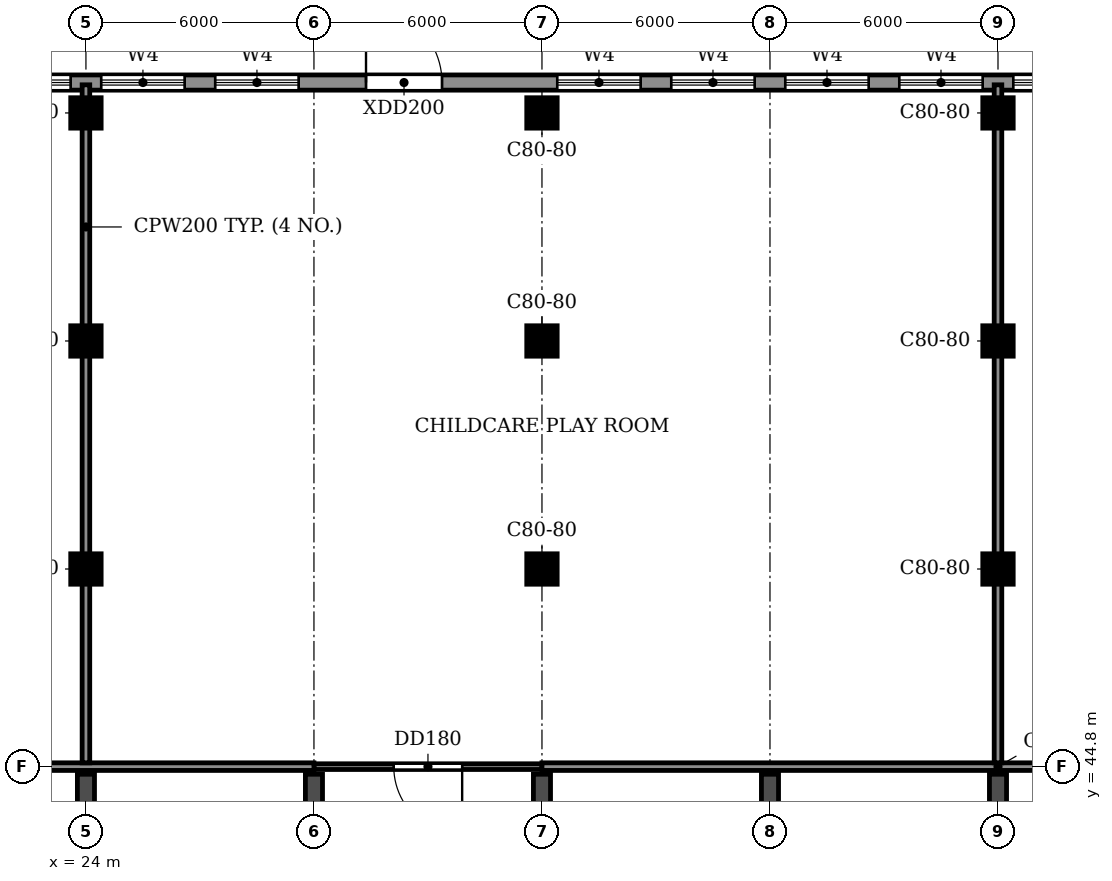
"""IFC4 building model, lengths in metres.
Left out: names, types, materials, properties, quantities, classifications, styles, units other than length and angle.
Written with IfcOpenShell. Run it as: python <this file> out.ifc"""

import sys

from ifc_helpers import new_model, si_unit, direction, frame, frame_2d, origin, origin_2d, place, context, subcontext, project, spatial, rectangle, extrude, source, transform, mapped, element, fill, save


model = new_model("IFC4")
c1 = context("Model", 3, precision=1e-05, world=origin(), true_north=direction((0.0, 1.0)))
c2 = subcontext(c1, "Body", "Model", "MODEL_VIEW")
j1 = project(units=[si_unit("LENGTHUNIT", "METRE"), si_unit("PLANEANGLEUNIT", "RADIAN")], contexts=[c1])
p1 = place(None, origin())
s1 = spatial("IfcSite", under=j1, at=p1, CompositionType="ELEMENT")
p2 = place(p1, origin())
s2 = spatial("IfcBuilding", under=s1, at=p2, CompositionType="ELEMENT")
p3 = place(p2, frame((0.0, 0.0, 10.8)))
s3 = spatial("IfcBuildingStorey", under=s2, at=p3, CompositionType="ELEMENT", Elevation=10.8)
for number, where, z_axis, x_axis in (
    (1, (24.0, 30.55, 0.0), (0.0, 0.0, 1.0), (0.0, 1.0, 0.0)),
    (2, (30.0, 30.55, 0.0), (0.0, 0.0, 1.0), (0.0, 1.0, 0.0)),
    (3, (36.0, 30.55, 0.0), (0.0, 0.0, 1.0), (0.0, 1.0, 0.0)),
    (4, (42.0, 30.55, 0.0), (0.0, 0.0, 1.0), (0.0, 1.0, 0.0)),
    (5, (48.0, 30.55, 0.0), (0.0, 0.0, 1.0), (0.0, 1.0, 0.0)),
):
    element("IfcWall", number, at=place(p3, frame(where, z_axis=z_axis, x_axis=x_axis)), inside=s3, PredefinedType="SHEAR", context=c2, shape_type="SweptSolid", body=[
        extrude(rectangle(XDim=14.05, YDim=0.45, at=frame_2d((7.025, 0.0))), origin(), (0.0, 0.0, 1.0), 3.92),
    ])
m1 = source(origin(), c2, "Body", "SweptSolid", [
    extrude(rectangle(XDim=0.8, YDim=0.8, at=origin_2d()), origin(), (0.0, 0.0, 1.0), 3.92),
])
for number, where, z_axis, x_axis in (
    (6, (24.0, 62.0, 0.0), (0.0, 0.0, 1.0), (1.0, 0.0, 0.0)),
    (7, (36.0, 62.0, 0.0), (0.0, 0.0, 1.0), (1.0, 0.0, 0.0)),
    (8, (48.0, 62.0, 0.0), (0.0, 0.0, 1.0), (1.0, 0.0, 0.0)),
    (9, (24.0, 56.0, 0.0), (0.0, 0.0, 1.0), (1.0, 0.0, 0.0)),
    (10, (36.0, 56.0, 0.0), (0.0, 0.0, 1.0), (1.0, 0.0, 0.0)),
    (11, (48.0, 56.0, 0.0), (0.0, 0.0, 1.0), (1.0, 0.0, 0.0)),
    (12, (24.0, 50.0, 0.0), (0.0, 0.0, 1.0), (1.0, 0.0, 0.0)),
    (13, (36.0, 50.0, 0.0), (0.0, 0.0, 1.0), (1.0, 0.0, 0.0)),
    (14, (48.0, 50.0, 0.0), (0.0, 0.0, 1.0), (1.0, 0.0, 0.0)),
):
    element("IfcColumn", number, at=place(p3, frame(where, z_axis=z_axis, x_axis=x_axis)), inside=s3, PredefinedType="COLUMN", context=c2, shape_type="MappedRepresentation", body=[
        mapped(m1, transform((0.0, 0.0, 0.0))),
    ])
p4 = place(p3, frame((105.0, 62.8, 0.0), z_axis=(0.0, 0.0, 1.0), x_axis=(-1.0, 0.0, 0.0)))
e15 = element("IfcWall", 15, at=p4, inside=s3, PredefinedType="STANDARD", context=c2, shape_type="SweptSolid", body=[
    extrude(rectangle(XDim=108.0, YDim=0.4, at=frame_2d((54.0, 0.0))), origin(), (0.0, 0.0, 1.0), 3.92),
])
p5 = place(p4, frame((102.4, 0.0, 0.9)))
e16 = element("IfcOpeningElement", 16, at=p5, cuts=e15, PredefinedType="OPENING", context=c2, shape_type="SweptSolid", body=[
    extrude(rectangle(XDim=2.2, YDim=2.7, at=frame_2d((1.1, 1.35))), frame((0.0, 0.21, 0.0), z_axis=(0.0, -1.0, 0.0), x_axis=(1.0, 0.0, 0.0)), (0.0, 0.0, 1.0), 0.42),
])
p6 = place(p4, frame((99.4, 0.0, 0.9)))
e17 = element("IfcOpeningElement", 17, at=p6, cuts=e15, PredefinedType="OPENING", context=c2, shape_type="SweptSolid", body=[
    extrude(rectangle(XDim=2.2, YDim=2.7, at=frame_2d((1.1, 1.35))), frame((0.0, 0.21, 0.0), z_axis=(0.0, -1.0, 0.0), x_axis=(1.0, 0.0, 0.0)), (0.0, 0.0, 1.0), 0.42),
])
p7 = place(p4, frame((90.4, 0.0, 0.9)))
e18 = element("IfcOpeningElement", 18, at=p7, cuts=e15, PredefinedType="OPENING", context=c2, shape_type="SweptSolid", body=[
    extrude(rectangle(XDim=2.2, YDim=2.7, at=frame_2d((1.1, 1.35))), frame((0.0, 0.21, 0.0), z_axis=(0.0, -1.0, 0.0), x_axis=(1.0, 0.0, 0.0)), (0.0, 0.0, 1.0), 0.42),
])
p8 = place(p4, frame((87.4, 0.0, 0.9)))
e19 = element("IfcOpeningElement", 19, at=p8, cuts=e15, PredefinedType="OPENING", context=c2, shape_type="SweptSolid", body=[
    extrude(rectangle(XDim=2.2, YDim=2.7, at=frame_2d((1.1, 1.35))), frame((0.0, 0.21, 0.0), z_axis=(0.0, -1.0, 0.0), x_axis=(1.0, 0.0, 0.0)), (0.0, 0.0, 1.0), 0.42),
])
p9 = place(p4, frame((84.4, 0.0, 0.9)))
e20 = element("IfcOpeningElement", 20, at=p9, cuts=e15, PredefinedType="OPENING", context=c2, shape_type="SweptSolid", body=[
    extrude(rectangle(XDim=2.2, YDim=2.7, at=frame_2d((1.1, 1.35))), frame((0.0, 0.21, 0.0), z_axis=(0.0, -1.0, 0.0), x_axis=(1.0, 0.0, 0.0)), (0.0, 0.0, 1.0), 0.42),
])
p10 = place(p4, frame((81.4, 0.0, 0.9)))
e21 = element("IfcOpeningElement", 21, at=p10, cuts=e15, PredefinedType="OPENING", context=c2, shape_type="SweptSolid", body=[
    extrude(rectangle(XDim=2.2, YDim=2.7, at=frame_2d((1.1, 1.35))), frame((0.0, 0.21, 0.0), z_axis=(0.0, -1.0, 0.0), x_axis=(1.0, 0.0, 0.0)), (0.0, 0.0, 1.0), 0.42),
])
p11 = place(p4, frame((78.4, 0.0, 0.9)))
e22 = element("IfcOpeningElement", 22, at=p11, cuts=e15, PredefinedType="OPENING", context=c2, shape_type="SweptSolid", body=[
    extrude(rectangle(XDim=2.2, YDim=2.7, at=frame_2d((1.1, 1.35))), frame((0.0, 0.21, 0.0), z_axis=(0.0, -1.0, 0.0), x_axis=(1.0, 0.0, 0.0)), (0.0, 0.0, 1.0), 0.42),
])
p12 = place(p4, frame((75.4, 0.0, 0.9)))
e23 = element("IfcOpeningElement", 23, at=p12, cuts=e15, PredefinedType="OPENING", context=c2, shape_type="SweptSolid", body=[
    extrude(rectangle(XDim=2.2, YDim=2.7, at=frame_2d((1.1, 1.35))), frame((0.0, 0.21, 0.0), z_axis=(0.0, -1.0, 0.0), x_axis=(1.0, 0.0, 0.0)), (0.0, 0.0, 1.0), 0.42),
])
p13 = place(p4, frame((66.4, 0.0, 0.9)))
e24 = element("IfcOpeningElement", 24, at=p13, cuts=e15, PredefinedType="OPENING", context=c2, shape_type="SweptSolid", body=[
    extrude(rectangle(XDim=2.2, YDim=2.7, at=frame_2d((1.1, 1.35))), frame((0.0, 0.21, 0.0), z_axis=(0.0, -1.0, 0.0), x_axis=(1.0, 0.0, 0.0)), (0.0, 0.0, 1.0), 0.42),
])
p14 = place(p4, frame((63.4, 0.0, 0.9)))
e25 = element("IfcOpeningElement", 25, at=p14, cuts=e15, PredefinedType="OPENING", context=c2, shape_type="SweptSolid", body=[
    extrude(rectangle(XDim=2.2, YDim=2.7, at=frame_2d((1.1, 1.35))), frame((0.0, 0.21, 0.0), z_axis=(0.0, -1.0, 0.0), x_axis=(1.0, 0.0, 0.0)), (0.0, 0.0, 1.0), 0.42),
])
p15 = place(p4, frame((60.4, 0.0, 0.9)))
e26 = element("IfcOpeningElement", 26, at=p15, cuts=e15, PredefinedType="OPENING", context=c2, shape_type="SweptSolid", body=[
    extrude(rectangle(XDim=2.2, YDim=2.7, at=frame_2d((1.1, 1.35))), frame((0.0, 0.21, 0.0), z_axis=(0.0, -1.0, 0.0), x_axis=(1.0, 0.0, 0.0)), (0.0, 0.0, 1.0), 0.42),
])
p16 = place(p4, frame((57.4, 0.0, 0.9)))
e27 = element("IfcOpeningElement", 27, at=p16, cuts=e15, PredefinedType="OPENING", context=c2, shape_type="SweptSolid", body=[
    extrude(rectangle(XDim=2.2, YDim=2.7, at=frame_2d((1.1, 1.35))), frame((0.0, 0.21, 0.0), z_axis=(0.0, -1.0, 0.0), x_axis=(1.0, 0.0, 0.0)), (0.0, 0.0, 1.0), 0.42),
])
p17 = place(p4, frame((54.4, 0.0, 0.9)))
e28 = element("IfcOpeningElement", 28, at=p17, cuts=e15, PredefinedType="OPENING", context=c2, shape_type="SweptSolid", body=[
    extrude(rectangle(XDim=2.2, YDim=2.7, at=frame_2d((1.1, 1.35))), frame((0.0, 0.21, 0.0), z_axis=(0.0, -1.0, 0.0), x_axis=(1.0, 0.0, 0.0)), (0.0, 0.0, 1.0), 0.42),
])
p18 = place(p4, frame((51.4, 0.0, 0.9)))
e29 = element("IfcOpeningElement", 29, at=p18, cuts=e15, PredefinedType="OPENING", context=c2, shape_type="SweptSolid", body=[
    extrude(rectangle(XDim=2.2, YDim=2.7, at=frame_2d((1.1, 1.35))), frame((0.0, 0.21, 0.0), z_axis=(0.0, -1.0, 0.0), x_axis=(1.0, 0.0, 0.0)), (0.0, 0.0, 1.0), 0.42),
])
p19 = place(p4, frame((48.4, 0.0, 0.9)))
e30 = element("IfcOpeningElement", 30, at=p19, cuts=e15, PredefinedType="OPENING", context=c2, shape_type="SweptSolid", body=[
    extrude(rectangle(XDim=2.2, YDim=2.7, at=frame_2d((1.1, 1.35))), frame((0.0, 0.21, 0.0), z_axis=(0.0, -1.0, 0.0), x_axis=(1.0, 0.0, 0.0)), (0.0, 0.0, 1.0), 0.42),
])
p20 = place(p4, frame((45.4, 0.0, 0.9)))
e31 = element("IfcOpeningElement", 31, at=p20, cuts=e15, PredefinedType="OPENING", context=c2, shape_type="SweptSolid", body=[
    extrude(rectangle(XDim=2.2, YDim=2.7, at=frame_2d((1.1, 1.35))), frame((0.0, 0.21, 0.0), z_axis=(0.0, -1.0, 0.0), x_axis=(1.0, 0.0, 0.0)), (0.0, 0.0, 1.0), 0.42),
])
p21 = place(p4, frame((42.4, 0.0, 0.9)))
e32 = element("IfcOpeningElement", 32, at=p21, cuts=e15, PredefinedType="OPENING", context=c2, shape_type="SweptSolid", body=[
    extrude(rectangle(XDim=2.2, YDim=2.7, at=frame_2d((1.1, 1.35))), frame((0.0, 0.21, 0.0), z_axis=(0.0, -1.0, 0.0), x_axis=(1.0, 0.0, 0.0)), (0.0, 0.0, 1.0), 0.42),
])
p22 = place(p4, frame((39.4, 0.0, 0.9)))
e33 = element("IfcOpeningElement", 33, at=p22, cuts=e15, PredefinedType="OPENING", context=c2, shape_type="SweptSolid", body=[
    extrude(rectangle(XDim=2.2, YDim=2.7, at=frame_2d((1.1, 1.35))), frame((0.0, 0.21, 0.0), z_axis=(0.0, -1.0, 0.0), x_axis=(1.0, 0.0, 0.0)), (0.0, 0.0, 1.0), 0.42),
])
p23 = place(p4, frame((36.4, 0.0, 0.9)))
e34 = element("IfcOpeningElement", 34, at=p23, cuts=e15, PredefinedType="OPENING", context=c2, shape_type="SweptSolid", body=[
    extrude(rectangle(XDim=2.2, YDim=2.7, at=frame_2d((1.1, 1.35))), frame((0.0, 0.21, 0.0), z_axis=(0.0, -1.0, 0.0), x_axis=(1.0, 0.0, 0.0)), (0.0, 0.0, 1.0), 0.42),
])
p24 = place(p4, frame((33.4, 0.0, 0.9)))
e35 = element("IfcOpeningElement", 35, at=p24, cuts=e15, PredefinedType="OPENING", context=c2, shape_type="SweptSolid", body=[
    extrude(rectangle(XDim=2.2, YDim=2.7, at=frame_2d((1.1, 1.35))), frame((0.0, 0.21, 0.0), z_axis=(0.0, -1.0, 0.0), x_axis=(1.0, 0.0, 0.0)), (0.0, 0.0, 1.0), 0.42),
])
p25 = place(p4, frame((30.4, 0.0, 0.9)))
e36 = element("IfcOpeningElement", 36, at=p25, cuts=e15, PredefinedType="OPENING", context=c2, shape_type="SweptSolid", body=[
    extrude(rectangle(XDim=2.2, YDim=2.7, at=frame_2d((1.1, 1.35))), frame((0.0, 0.21, 0.0), z_axis=(0.0, -1.0, 0.0), x_axis=(1.0, 0.0, 0.0)), (0.0, 0.0, 1.0), 0.42),
])
p26 = place(p4, frame((27.4, 0.0, 0.9)))
e37 = element("IfcOpeningElement", 37, at=p26, cuts=e15, PredefinedType="OPENING", context=c2, shape_type="SweptSolid", body=[
    extrude(rectangle(XDim=2.2, YDim=2.7, at=frame_2d((1.1, 1.35))), frame((0.0, 0.21, 0.0), z_axis=(0.0, -1.0, 0.0), x_axis=(1.0, 0.0, 0.0)), (0.0, 0.0, 1.0), 0.42),
])
p27 = place(p4, frame((24.4, 0.0, 0.9)))
e38 = element("IfcOpeningElement", 38, at=p27, cuts=e15, PredefinedType="OPENING", context=c2, shape_type="SweptSolid", body=[
    extrude(rectangle(XDim=2.2, YDim=2.7, at=frame_2d((1.1, 1.35))), frame((0.0, 0.21, 0.0), z_axis=(0.0, -1.0, 0.0), x_axis=(1.0, 0.0, 0.0)), (0.0, 0.0, 1.0), 0.42),
])
p28 = place(p4, frame((21.4, 0.0, 0.9)))
e39 = element("IfcOpeningElement", 39, at=p28, cuts=e15, PredefinedType="OPENING", context=c2, shape_type="SweptSolid", body=[
    extrude(rectangle(XDim=2.2, YDim=2.7, at=frame_2d((1.1, 1.35))), frame((0.0, 0.21, 0.0), z_axis=(0.0, -1.0, 0.0), x_axis=(1.0, 0.0, 0.0)), (0.0, 0.0, 1.0), 0.42),
])
p29 = place(p4, frame((18.4, 0.0, 0.9)))
e40 = element("IfcOpeningElement", 40, at=p29, cuts=e15, PredefinedType="OPENING", context=c2, shape_type="SweptSolid", body=[
    extrude(rectangle(XDim=2.2, YDim=2.7, at=frame_2d((1.1, 1.35))), frame((0.0, 0.21, 0.0), z_axis=(0.0, -1.0, 0.0), x_axis=(1.0, 0.0, 0.0)), (0.0, 0.0, 1.0), 0.42),
])
p30 = place(p4, frame((15.4, 0.0, 0.9)))
e41 = element("IfcOpeningElement", 41, at=p30, cuts=e15, PredefinedType="OPENING", context=c2, shape_type="SweptSolid", body=[
    extrude(rectangle(XDim=2.2, YDim=2.7, at=frame_2d((1.1, 1.35))), frame((0.0, 0.21, 0.0), z_axis=(0.0, -1.0, 0.0), x_axis=(1.0, 0.0, 0.0)), (0.0, 0.0, 1.0), 0.42),
])
p31 = place(p4, frame((12.4, 0.0, 0.9)))
e42 = element("IfcOpeningElement", 42, at=p31, cuts=e15, PredefinedType="OPENING", context=c2, shape_type="SweptSolid", body=[
    extrude(rectangle(XDim=2.2, YDim=2.7, at=frame_2d((1.1, 1.35))), frame((0.0, 0.21, 0.0), z_axis=(0.0, -1.0, 0.0), x_axis=(1.0, 0.0, 0.0)), (0.0, 0.0, 1.0), 0.42),
])
p32 = place(p4, frame((9.4, 0.0, 0.9)))
e43 = element("IfcOpeningElement", 43, at=p32, cuts=e15, PredefinedType="OPENING", context=c2, shape_type="SweptSolid", body=[
    extrude(rectangle(XDim=2.2, YDim=2.7, at=frame_2d((1.1, 1.35))), frame((0.0, 0.21, 0.0), z_axis=(0.0, -1.0, 0.0), x_axis=(1.0, 0.0, 0.0)), (0.0, 0.0, 1.0), 0.42),
])
p33 = place(p4, frame((93.8, 0.0, 0.0)))
e44 = element("IfcOpeningElement", 44, at=p33, cuts=e15, PredefinedType="OPENING", context=c2, shape_type="SweptSolid", body=[
    extrude(rectangle(XDim=2.0, YDim=2.4, at=frame_2d((1.0, 1.2))), frame((0.0, 0.21, 0.0), z_axis=(0.0, -1.0, 0.0), x_axis=(1.0, 0.0, 0.0)), (0.0, 0.0, 1.0), 0.42),
])
p34 = place(p4, frame((71.63, 0.0, 0.0)))
e45 = element("IfcOpeningElement", 45, at=p34, cuts=e15, PredefinedType="OPENING", context=c2, shape_type="SweptSolid", body=[
    extrude(rectangle(XDim=2.0, YDim=2.4, at=frame_2d((1.0, 1.2))), frame((0.0, 0.21, 0.0), z_axis=(0.0, -1.0, 0.0), x_axis=(1.0, 0.0, 0.0)), (0.0, 0.0, 1.0), 0.42),
])
p35 = place(p3, frame((30.0, 44.8, 0.0), z_axis=(0.0, 0.0, 1.0), x_axis=(1.0, 0.0, 0.0)))
e46 = element("IfcWall", 46, at=p35, inside=s3, PredefinedType="PARTITIONING", context=c2, shape_type="SweptSolid", body=[
    extrude(rectangle(XDim=6.0, YDim=0.15, at=frame_2d((3.0, 0.0))), origin(), (0.0, 0.0, 1.0), 3.92),
])
p36 = place(p35, frame((2.1, 0.0, 0.0)))
e47 = element("IfcOpeningElement", 47, at=p36, cuts=e46, PredefinedType="OPENING", context=c2, shape_type="SweptSolid", body=[
    extrude(rectangle(XDim=1.8, YDim=2.1, at=frame_2d((0.9, 1.05))), frame((0.0, 0.085, 0.0), z_axis=(0.0, -1.0, 0.0), x_axis=(1.0, 0.0, 0.0)), (0.0, 0.0, 1.0), 0.17),
])
p37 = place(p3, frame((12.0, 44.8, 0.0), z_axis=(0.0, 0.0, 1.0), x_axis=(1.0, 0.0, 0.0)))
e48 = element("IfcWall", 48, at=p37, inside=s3, PredefinedType="PARTITIONING", context=c2, shape_type="SweptSolid", body=[
    extrude(rectangle(XDim=18.0, YDim=0.2, at=frame_2d((9.0, 0.0))), origin(), (0.0, 0.0, 1.0), 3.92),
])
p38 = place(p3, frame((36.0, 44.8, 0.0), z_axis=(0.0, 0.0, 1.0), x_axis=(1.0, 0.0, 0.0)))
e49 = element("IfcWall", 49, at=p38, inside=s3, PredefinedType="PARTITIONING", context=c2, shape_type="SweptSolid", body=[
    extrude(rectangle(XDim=24.0, YDim=0.2, at=frame_2d((12.0, 0.0))), origin(), (0.0, 0.0, 1.0), 3.92),
])
for number, where, z_axis, x_axis in (
    (50, (24.0, 44.9, 0.0), (0.0, 0.0, 1.0), (0.0, 1.0, 0.0)),
    (51, (48.0, 44.9, 0.0), (0.0, 0.0, 1.0), (0.0, 1.0, 0.0)),
):
    element("IfcWall", number, at=place(p3, frame(where, z_axis=z_axis, x_axis=x_axis)), inside=s3, PredefinedType="PARTITIONING", context=c2, shape_type="SweptSolid", body=[
        extrude(rectangle(XDim=17.84, YDim=0.2, at=frame_2d((8.92, 0.0))), origin(), (0.0, 0.0, 1.0), 3.92),
    ])
p39 = place(p10, origin())
e52 = element("IfcWindow", 52, at=p39, inside=s3, PartitioningType="DOUBLE_PANEL_HORIZONTAL", PredefinedType="WINDOW", context=c2, shape_type="SweptSolid", body=[
    extrude(rectangle(XDim=2.2, YDim=2.7, at=frame_2d((1.1, 1.35))), frame((0.0, 0.03, 0.0), z_axis=(0.0, -1.0, 0.0), x_axis=(1.0, 0.0, 0.0)), (0.0, 0.0, 1.0), 0.06),
])
fill(e21, e52)
p40 = place(p11, origin())
e53 = element("IfcWindow", 53, at=p40, inside=s3, PartitioningType="DOUBLE_PANEL_HORIZONTAL", PredefinedType="WINDOW", context=c2, shape_type="SweptSolid", body=[
    extrude(rectangle(XDim=2.2, YDim=2.7, at=frame_2d((1.1, 1.35))), frame((0.0, 0.03, 0.0), z_axis=(0.0, -1.0, 0.0), x_axis=(1.0, 0.0, 0.0)), (0.0, 0.0, 1.0), 0.06),
])
fill(e22, e53)
p41 = place(p12, origin())
e54 = element("IfcWindow", 54, at=p41, inside=s3, PartitioningType="DOUBLE_PANEL_HORIZONTAL", PredefinedType="WINDOW", context=c2, shape_type="SweptSolid", body=[
    extrude(rectangle(XDim=2.2, YDim=2.7, at=frame_2d((1.1, 1.35))), frame((0.0, 0.03, 0.0), z_axis=(0.0, -1.0, 0.0), x_axis=(1.0, 0.0, 0.0)), (0.0, 0.0, 1.0), 0.06),
])
fill(e23, e54)
p42 = place(p13, origin())
e55 = element("IfcWindow", 55, at=p42, inside=s3, PartitioningType="DOUBLE_PANEL_HORIZONTAL", PredefinedType="WINDOW", context=c2, shape_type="SweptSolid", body=[
    extrude(rectangle(XDim=2.2, YDim=2.7, at=frame_2d((1.1, 1.35))), frame((0.0, 0.03, 0.0), z_axis=(0.0, -1.0, 0.0), x_axis=(1.0, 0.0, 0.0)), (0.0, 0.0, 1.0), 0.06),
])
fill(e24, e55)
p43 = place(p14, origin())
e56 = element("IfcWindow", 56, at=p43, inside=s3, PartitioningType="DOUBLE_PANEL_HORIZONTAL", PredefinedType="WINDOW", context=c2, shape_type="SweptSolid", body=[
    extrude(rectangle(XDim=2.2, YDim=2.7, at=frame_2d((1.1, 1.35))), frame((0.0, 0.03, 0.0), z_axis=(0.0, -1.0, 0.0), x_axis=(1.0, 0.0, 0.0)), (0.0, 0.0, 1.0), 0.06),
])
fill(e25, e56)
p44 = place(p15, origin())
e57 = element("IfcWindow", 57, at=p44, inside=s3, PartitioningType="DOUBLE_PANEL_HORIZONTAL", PredefinedType="WINDOW", context=c2, shape_type="SweptSolid", body=[
    extrude(rectangle(XDim=2.2, YDim=2.7, at=frame_2d((1.1, 1.35))), frame((0.0, 0.03, 0.0), z_axis=(0.0, -1.0, 0.0), x_axis=(1.0, 0.0, 0.0)), (0.0, 0.0, 1.0), 0.06),
])
fill(e26, e57)
p45 = place(p16, origin())
e58 = element("IfcWindow", 58, at=p45, inside=s3, PartitioningType="DOUBLE_PANEL_HORIZONTAL", PredefinedType="WINDOW", context=c2, shape_type="SweptSolid", body=[
    extrude(rectangle(XDim=2.2, YDim=2.7, at=frame_2d((1.1, 1.35))), frame((0.0, 0.03, 0.0), z_axis=(0.0, -1.0, 0.0), x_axis=(1.0, 0.0, 0.0)), (0.0, 0.0, 1.0), 0.06),
])
fill(e27, e58)
p46 = place(p17, origin())
e59 = element("IfcWindow", 59, at=p46, inside=s3, PartitioningType="DOUBLE_PANEL_HORIZONTAL", PredefinedType="WINDOW", context=c2, shape_type="SweptSolid", body=[
    extrude(rectangle(XDim=2.2, YDim=2.7, at=frame_2d((1.1, 1.35))), frame((0.0, 0.03, 0.0), z_axis=(0.0, -1.0, 0.0), x_axis=(1.0, 0.0, 0.0)), (0.0, 0.0, 1.0), 0.06),
])
fill(e28, e59)
p47 = place(p36, frame((1.8, 0.0, 0.0), z_axis=(0.0, 0.0, 1.0), x_axis=(-1.0, 0.0, 0.0)))
e60 = element("IfcDoor", 60, at=p47, inside=s3, OperationType="DOUBLE_DOOR_SINGLE_SWING", PredefinedType="DOOR", context=c2, shape_type="SweptSolid", body=[
    extrude(rectangle(XDim=1.8, YDim=2.1, at=frame_2d((0.9, 1.05))), frame((0.0, 0.025, 0.0), z_axis=(0.0, -1.0, 0.0), x_axis=(1.0, 0.0, 0.0)), (0.0, 0.0, 1.0), 0.05),
])
fill(e47, e60)
p48 = place(p34, frame((2.0, 0.0, 0.0), z_axis=(0.0, 0.0, 1.0), x_axis=(-1.0, 0.0, 0.0)))
e61 = element("IfcDoor", 61, at=p48, inside=s3, OperationType="DOUBLE_DOOR_SINGLE_SWING", PredefinedType="DOOR", context=c2, shape_type="SweptSolid", body=[
    extrude(rectangle(XDim=2.0, YDim=2.4, at=frame_2d((1.0, 1.2))), frame((0.0, 0.025, 0.0), z_axis=(0.0, -1.0, 0.0), x_axis=(1.0, 0.0, 0.0)), (0.0, 0.0, 1.0), 0.05),
])
fill(e45, e61)
save(model, sys.argv[1])
